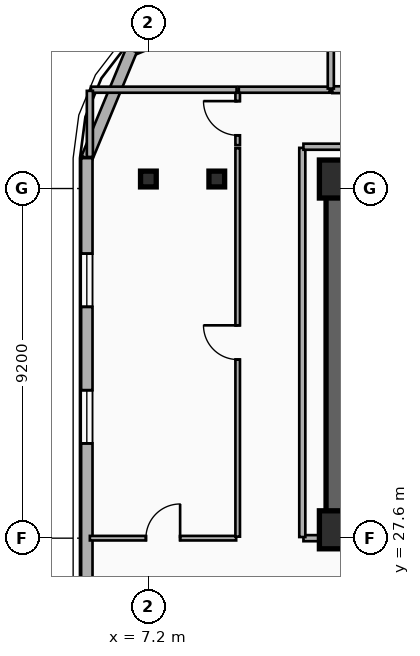
"""IFC4 building model, lengths in metres.
Left out: names, types, materials, properties, quantities, classifications, styles, units other than length and angle.
Written with IfcOpenShell. Run it as: python <this file> out.ifc"""

import sys

from ifc_helpers import new_model, si_unit, direction, frame, frame_2d, origin, origin_2d, place, context, subcontext, project, spatial, rectangle, i_section, extrude, element, fill, save


model = new_model("IFC4")
c1 = context("Model", 3, precision=1e-05, world=origin(), true_north=direction((0.0, 1.0)))
c2 = subcontext(c1, "Body", "Model", "MODEL_VIEW")
j1 = project(units=[si_unit("LENGTHUNIT", "METRE"), si_unit("PLANEANGLEUNIT", "RADIAN")], contexts=[c1])
p1 = place(None, origin())
s1 = spatial("IfcSite", under=j1, at=p1, CompositionType="ELEMENT")
p2 = place(p1, origin())
s2 = spatial("IfcBuilding", under=s1, at=p2, CompositionType="ELEMENT")
p3 = place(p2, frame((0.0, 0.0, 183.85)))
s3 = spatial("IfcBuildingStorey", under=s2, at=p3, CompositionType="ELEMENT", Elevation=183.85)
p4 = place(p3, frame((12.15, 37.05, 0.0), z_axis=(0.0, 0.0, 1.0), x_axis=(1.0, 0.0, 0.0)))
e1 = element("IfcWall", 1, at=p4, inside=s3, PredefinedType="SHEAR", context=c2, shape_type="SweptSolid", body=[
    extrude(rectangle(XDim=33.23, YDim=0.55, at=frame_2d((16.615, 0.0))), origin(), (0.0, 0.0, 1.0), 4.55),
])
p5 = place(p3, frame((21.18, 27.82, 0.0), z_axis=(0.0, 0.0, 1.0), x_axis=(-1.0, 0.0, 0.0)))
e2 = element("IfcWall", 2, at=p5, inside=s3, PredefinedType="SHEAR", context=c2, shape_type="SweptSolid", body=[
    extrude(rectangle(XDim=9.03, YDim=0.55, at=frame_2d((4.515, 0.0))), origin(), (0.0, 0.0, 1.0), 4.55),
])
p6 = place(p5, frame((2.68, 0.0, 0.0)))
e3 = element("IfcOpeningElement", 3, at=p6, cuts=e2, PredefinedType="OPENING", context=c2, shape_type="SweptSolid", body=[
    extrude(rectangle(XDim=1.1, YDim=2.15, at=frame_2d((0.55, 1.075))), frame((0.0, 0.285, 0.0), z_axis=(0.0, -1.0, 0.0), x_axis=(1.0, 0.0, 0.0)), (0.0, 0.0, 1.0), 0.57),
])
p7 = place(p3, frame((12.15, 28.095, 0.0), z_axis=(0.0, 0.0, 1.0), x_axis=(0.0, 1.0, 0.0)))
e4 = element("IfcWall", 4, at=p7, inside=s3, PredefinedType="SHEAR", context=c2, shape_type="SweptSolid", body=[
    extrude(rectangle(XDim=8.68, YDim=0.55, at=frame_2d((4.34, 0.0))), origin(), (0.0, 0.0, 1.0), 4.55),
])
for number, where, z_axis, x_axis in (
    (5, (12.2, 27.82, 0.0), (0.0, 0.0, 1.0), (1.0, 0.0, 0.0)),
    (6, (12.2, 37.05, 0.0), (0.0, 0.0, 1.0), (1.0, 0.0, 0.0)),
):
    element("IfcColumn", number, at=place(p3, frame(where, z_axis=z_axis, x_axis=x_axis)), inside=s3, PredefinedType="COLUMN", context=c2, shape_type="SweptSolid", body=[
        extrude(rectangle(XDim=1.0, YDim=1.0, at=origin_2d()), origin(), (0.0, 0.0, 1.0), 4.55),
    ])
for number, where, z_axis, x_axis in (
    (7, (9.0, 37.05, 0.0), (0.0, 0.0, 1.0), (1.0, 0.0, 0.0)),
    (8, (7.2, 37.05, 0.0), (0.0, 0.0, 1.0), (1.0, 0.0, 0.0)),
):
    element("IfcColumn", number, at=place(p3, frame(where, z_axis=z_axis, x_axis=x_axis)), inside=s3, PredefinedType="COLUMN", context=c2, shape_type="SweptSolid", body=[
        extrude(i_section(OverallWidth=0.413, OverallDepth=0.415, WebThickness=0.03, FlangeThickness=0.047, FilletRadius=0.015, at=origin_2d()), origin(), (0.0, 0.0, 1.0), 4.55),
    ])
p8 = place(p3, frame((6.757, 40.443, 0.0), z_axis=(0.0, 0.0, 1.0), x_axis=(0.923882414032, 0.382676475685, 0.0)))
e9 = element("IfcWall", 9, at=p8, inside=s3, PredefinedType="SOLIDWALL", context=c2, shape_type="SweptSolid", body=[
    extrude(rectangle(XDim=3.077, YDim=0.3, at=frame_2d((1.539, 0.0))), origin(), (0.0, 0.0, 1.0), 4.23),
])
p9 = place(p3, frame((5.58, 37.6, 0.0), z_axis=(0.0, 0.0, 1.0), x_axis=(0.382636798336, 0.92389884758, 0.0)))
e10 = element("IfcWall", 10, at=p9, inside=s3, PredefinedType="SOLIDWALL", context=c2, shape_type="SweptSolid", body=[
    extrude(rectangle(XDim=3.077, YDim=0.3, at=frame_2d((1.538, 0.0))), origin(), (0.0, 0.0, 1.0), 4.23),
])
p10 = place(p3, frame((5.58, 14.6, 0.0), z_axis=(0.0, 0.0, 1.0), x_axis=(0.0, 1.0, 0.0)))
e11 = element("IfcWall", 11, at=p10, inside=s3, PredefinedType="SOLIDWALL", context=c2, shape_type="SweptSolid", body=[
    extrude(rectangle(XDim=23.0, YDim=0.3, at=frame_2d((11.5, 0.0))), origin(), (0.0, 0.0, 1.0), 4.23),
])
p11 = place(p10, frame((2.797, 0.0, 0.75)))
e12 = element("IfcOpeningElement", 12, at=p11, cuts=e11, PredefinedType="OPENING", context=c2, shape_type="SweptSolid", body=[
    extrude(rectangle(XDim=1.4, YDim=2.1, at=frame_2d((0.7, 1.05))), frame((0.0, 0.16, 0.0), z_axis=(0.0, -1.0, 0.0), x_axis=(1.0, 0.0, 0.0)), (0.0, 0.0, 1.0), 0.32),
])
p12 = place(p10, frame((6.673, 0.0, 0.75)))
e13 = element("IfcOpeningElement", 13, at=p12, cuts=e11, PredefinedType="OPENING", context=c2, shape_type="SweptSolid", body=[
    extrude(rectangle(XDim=1.4, YDim=2.1, at=frame_2d((0.7, 1.05))), frame((0.0, 0.16, 0.0), z_axis=(0.0, -1.0, 0.0), x_axis=(1.0, 0.0, 0.0)), (0.0, 0.0, 1.0), 0.32),
])
p13 = place(p10, frame((15.493, 0.0, 0.75)))
e14 = element("IfcOpeningElement", 14, at=p13, cuts=e11, PredefinedType="OPENING", context=c2, shape_type="SweptSolid", body=[
    extrude(rectangle(XDim=1.4, YDim=2.1, at=frame_2d((0.7, 1.05))), frame((0.0, 0.16, 0.0), z_axis=(0.0, -1.0, 0.0), x_axis=(1.0, 0.0, 0.0)), (0.0, 0.0, 1.0), 0.32),
])
p14 = place(p10, frame((19.087, 0.0, 0.75)))
e15 = element("IfcOpeningElement", 15, at=p14, cuts=e11, PredefinedType="OPENING", context=c2, shape_type="SweptSolid", body=[
    extrude(rectangle(XDim=1.4, YDim=2.1, at=frame_2d((0.7, 1.05))), frame((0.0, 0.16, 0.0), z_axis=(0.0, -1.0, 0.0), x_axis=(1.0, 0.0, 0.0)), (0.0, 0.0, 1.0), 0.32),
])
p15 = place(p3, frame((5.66, 27.6, 0.0), z_axis=(0.0, 0.0, 1.0), x_axis=(1.0, 0.0, 0.0)))
e16 = element("IfcWall", 16, at=p15, inside=s3, PredefinedType="PARTITIONING", context=c2, shape_type="SweptSolid", body=[
    extrude(rectangle(XDim=3.85, YDim=0.12, at=frame_2d((1.925, 0.0))), origin(), (0.0, 0.0, 1.0), 3.56),
])
p16 = place(p15, frame((1.475, 0.0, 0.0)))
e17 = element("IfcOpeningElement", 17, at=p16, cuts=e16, PredefinedType="OPENING", context=c2, shape_type="SweptSolid", body=[
    extrude(rectangle(XDim=0.9, YDim=2.1, at=frame_2d((0.45, 1.05))), frame((0.0, 0.07, 0.0), z_axis=(0.0, -1.0, 0.0), x_axis=(1.0, 0.0, 0.0)), (0.0, 0.0, 1.0), 0.14),
])
p17 = place(p3, frame((9.55, 27.64, 0.0), z_axis=(0.0, 0.0, 1.0), x_axis=(0.0, 1.0, 0.0)))
e18 = element("IfcWall", 18, at=p17, inside=s3, PredefinedType="PARTITIONING", context=c2, shape_type="SweptSolid", body=[
    extrude(rectangle(XDim=10.22, YDim=0.12, at=frame_2d((5.11, 0.0))), origin(), (0.0, 0.0, 1.0), 3.71),
])
p18 = place(p17, frame((4.66, 0.0, 0.0)))
e19 = element("IfcOpeningElement", 19, at=p18, cuts=e18, PredefinedType="OPENING", context=c2, shape_type="SweptSolid", body=[
    extrude(rectangle(XDim=0.9, YDim=2.1, at=frame_2d((0.45, 1.05))), frame((0.0, 0.07, 0.0), z_axis=(0.0, -1.0, 0.0), x_axis=(1.0, 0.0, 0.0)), (0.0, 0.0, 1.0), 0.14),
])
p19 = place(p3, frame((9.55, 37.94, 0.0), z_axis=(0.0, 0.0, 1.0), x_axis=(0.0, 1.0, 0.0)))
e20 = element("IfcWall", 20, at=p19, inside=s3, PredefinedType="PARTITIONING", context=c2, shape_type="SweptSolid", body=[
    extrude(rectangle(XDim=1.42, YDim=0.12, at=frame_2d((0.71, 0.0))), origin(), (0.0, 0.0, 1.0), 4.23),
])
p20 = place(p19, frame((0.26, 0.0, 0.0)))
e21 = element("IfcOpeningElement", 21, at=p20, cuts=e20, PredefinedType="OPENING", context=c2, shape_type="SweptSolid", body=[
    extrude(rectangle(XDim=0.9, YDim=2.1, at=frame_2d((0.45, 1.05))), frame((0.0, 0.07, 0.0), z_axis=(0.0, -1.0, 0.0), x_axis=(1.0, 0.0, 0.0)), (0.0, 0.0, 1.0), 0.14),
])
p21 = place(p3, frame((12.04, 39.4, 0.0), z_axis=(0.0, 0.0, 1.0), x_axis=(1.0, 0.0, 0.0)))
e22 = element("IfcWall", 22, at=p21, inside=s3, PredefinedType="PLUMBINGWALL", context=c2, shape_type="SweptSolid", body=[
    extrude(rectangle(XDim=9.22, YDim=0.18, at=frame_2d((4.61, 0.0))), origin(), (0.0, 0.0, 1.0), 4.23),
])
p22 = place(p21, frame((4.11, 0.0, 0.0)))
e23 = element("IfcOpeningElement", 23, at=p22, cuts=e22, PredefinedType="OPENING", context=c2, shape_type="SweptSolid", body=[
    extrude(rectangle(XDim=1.0, YDim=2.15, at=frame_2d((0.5, 1.075))), frame((0.0, 0.1, 0.0), z_axis=(0.0, -1.0, 0.0), x_axis=(1.0, 0.0, 0.0)), (0.0, 0.0, 1.0), 0.2),
])
p23 = place(p3, frame((11.28, 27.6, 0.0), z_axis=(0.0, 0.0, 1.0), x_axis=(1.0, 0.0, 0.0)))
e24 = element("IfcWall", 24, at=p23, inside=s3, PredefinedType="PARTITIONING", context=c2, shape_type="SweptSolid", body=[
    extrude(rectangle(XDim=0.84, YDim=0.16, at=frame_2d((0.42, 0.0))), origin(), (0.0, 0.0, 1.0), 3.3),
])
p24 = place(p3, frame((11.25, 27.63, 0.0), z_axis=(0.0, 0.0, 1.0), x_axis=(0.0, 1.0, 0.0)))
e25 = element("IfcWall", 25, at=p24, inside=s3, PredefinedType="PARTITIONING", context=c2, shape_type="SweptSolid", body=[
    extrude(rectangle(XDim=10.24, YDim=0.16, at=frame_2d((5.12, 0.0))), origin(), (0.0, 0.0, 1.0), 3.71),
])
p25 = place(p3, frame((11.28, 37.9, 0.0), z_axis=(0.0, 0.0, 1.0), x_axis=(1.0, 0.0, 0.0)))
e26 = element("IfcWall", 26, at=p25, inside=s3, PredefinedType="PARTITIONING", context=c2, shape_type="SweptSolid", body=[
    extrude(rectangle(XDim=35.04, YDim=0.16, at=frame_2d((17.52, 0.0))), origin(), (0.0, 0.0, 1.0), 4.23),
])
p26 = place(p3, frame((9.58, 39.4, 0.0), z_axis=(0.0, 0.0, 1.0), x_axis=(1.0, 0.0, 0.0)))
e27 = element("IfcWall", 27, at=p26, inside=s3, PredefinedType="PARTITIONING", context=c2, shape_type="SweptSolid", body=[
    extrude(rectangle(XDim=2.39, YDim=0.16, at=frame_2d((1.195, 0.0))), origin(), (0.0, 0.0, 1.0), 4.23),
])
p27 = place(p3, frame((5.69, 39.4, 0.0), z_axis=(0.0, 0.0, 1.0), x_axis=(1.0, 0.0, 0.0)))
e28 = element("IfcWall", 28, at=p27, inside=s3, PredefinedType="PARTITIONING", context=c2, shape_type="SweptSolid", body=[
    extrude(rectangle(XDim=3.83, YDim=0.16, at=frame_2d((1.915, 0.0))), origin(), (0.0, 0.0, 1.0), 4.23),
])
p28 = place(p3, frame((5.66, 37.63, 0.0), z_axis=(0.0, 0.0, 1.0), x_axis=(0.0, 1.0, 0.0)))
e29 = element("IfcWall", 29, at=p28, inside=s3, PredefinedType="PARTITIONING", context=c2, shape_type="SweptSolid", body=[
    extrude(rectangle(XDim=1.74, YDim=0.16, at=frame_2d((0.87, 0.0))), origin(), (0.0, 0.0, 1.0), 4.23),
])
p29 = place(p3, frame((12.0, 39.43, 0.0), z_axis=(0.0, 0.0, 1.0), x_axis=(0.0, 1.0, 0.0)))
e30 = element("IfcWall", 30, at=p29, inside=s3, PredefinedType="PARTITIONING", context=c2, shape_type="SweptSolid", body=[
    extrude(rectangle(XDim=2.08, YDim=0.16, at=frame_2d((1.04, 0.0))), origin(), (0.0, 0.0, 1.0), 4.23),
])
p30 = place(p13, origin())
e31 = element("IfcWindow", 31, at=p30, inside=s3, PartitioningType="SINGLE_PANEL", PredefinedType="WINDOW", context=c2, shape_type="SweptSolid", body=[
    extrude(rectangle(XDim=1.4, YDim=2.1, at=frame_2d((0.7, 1.05))), frame((0.0, 0.03, 0.0), z_axis=(0.0, -1.0, 0.0), x_axis=(1.0, 0.0, 0.0)), (0.0, 0.0, 1.0), 0.06),
])
fill(e14, e31)
p31 = place(p14, origin())
e32 = element("IfcWindow", 32, at=p31, inside=s3, PartitioningType="SINGLE_PANEL", PredefinedType="WINDOW", context=c2, shape_type="SweptSolid", body=[
    extrude(rectangle(XDim=1.4, YDim=2.1, at=frame_2d((0.7, 1.05))), frame((0.0, 0.03, 0.0), z_axis=(0.0, -1.0, 0.0), x_axis=(1.0, 0.0, 0.0)), (0.0, 0.0, 1.0), 0.06),
])
fill(e15, e32)
p32 = place(p16, origin())
e33 = element("IfcDoor", 33, at=p32, inside=s3, OperationType="SINGLE_SWING_RIGHT", PredefinedType="DOOR", context=c2, shape_type="SweptSolid", body=[
    extrude(rectangle(XDim=0.9, YDim=2.1, at=frame_2d((0.45, 1.05))), frame((0.0, 0.025, 0.0), z_axis=(0.0, -1.0, 0.0), x_axis=(1.0, 0.0, 0.0)), (0.0, 0.0, 1.0), 0.05),
])
fill(e17, e33)
p33 = place(p18, origin())
e34 = element("IfcDoor", 34, at=p33, inside=s3, OperationType="SINGLE_SWING_RIGHT", PredefinedType="DOOR", context=c2, shape_type="SweptSolid", body=[
    extrude(rectangle(XDim=0.9, YDim=2.1, at=frame_2d((0.45, 1.05))), frame((0.0, 0.025, 0.0), z_axis=(0.0, -1.0, 0.0), x_axis=(1.0, 0.0, 0.0)), (0.0, 0.0, 1.0), 0.05),
])
fill(e19, e34)
p34 = place(p20, origin())
e35 = element("IfcDoor", 35, at=p34, inside=s3, OperationType="SINGLE_SWING_RIGHT", PredefinedType="DOOR", context=c2, shape_type="SweptSolid", body=[
    extrude(rectangle(XDim=0.9, YDim=2.1, at=frame_2d((0.45, 1.05))), frame((0.0, 0.025, 0.0), z_axis=(0.0, -1.0, 0.0), x_axis=(1.0, 0.0, 0.0)), (0.0, 0.0, 1.0), 0.05),
])
fill(e21, e35)
save(model, sys.argv[1])
